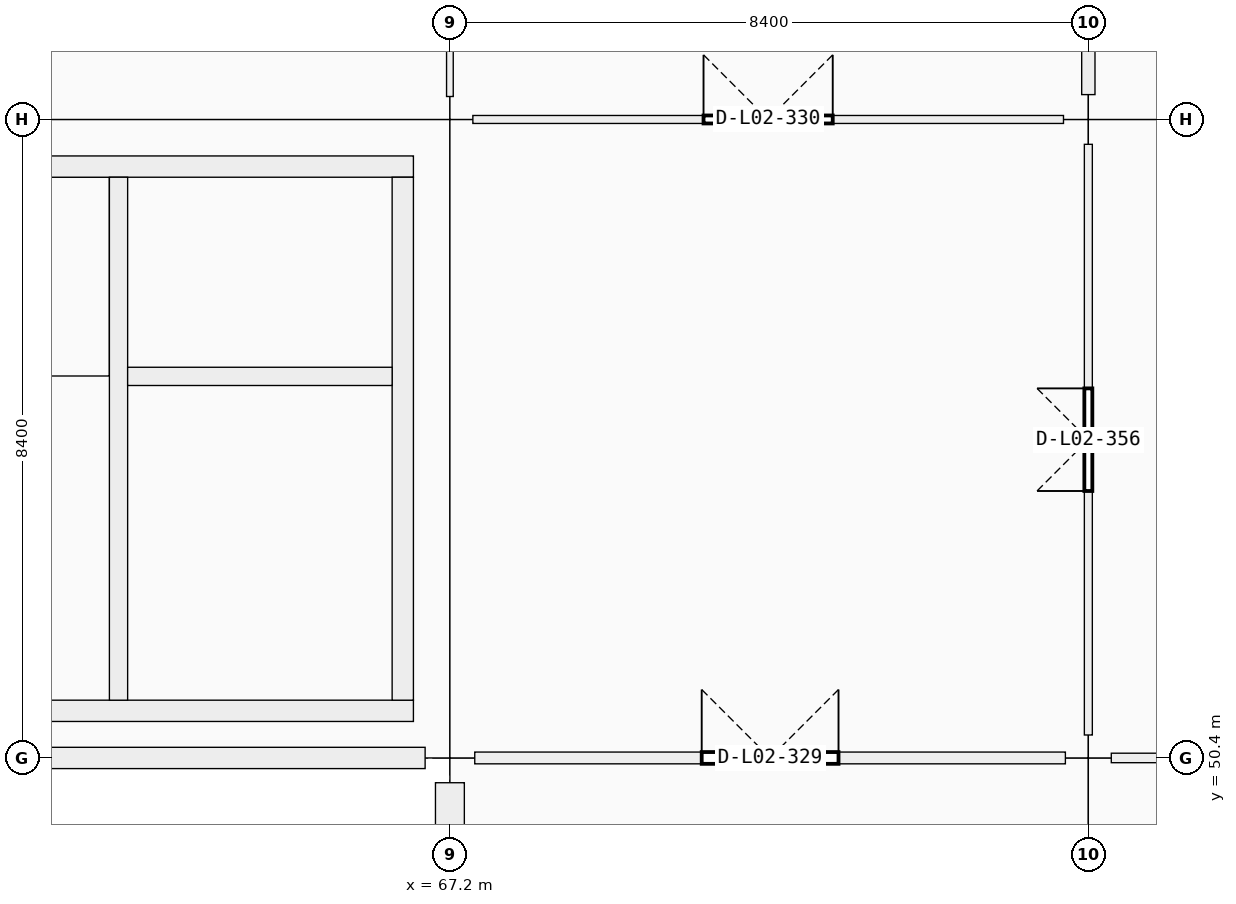
"""IFC4 building model, lengths in metres.
Left out: names, types, materials, properties, quantities, classifications, styles, units other than length and angle.
Written with IfcOpenShell. Run it as: python <this file> out.ifc"""

import sys

from ifc_helpers import new_model, si_unit, direction, frame, frame_2d, origin, origin_2d, place, context, subcontext, project, spatial, rectangle, extrude, element, fill, save


model = new_model("IFC4")
c1 = context("Model", 3, precision=1e-05, world=origin(), true_north=direction((0.0, 1.0)))
c2 = subcontext(c1, "Body", "Model", "MODEL_VIEW")
j1 = project(units=[si_unit("LENGTHUNIT", "METRE"), si_unit("PLANEANGLEUNIT", "RADIAN")], contexts=[c1])
p1 = place(None, origin())
s1 = spatial("IfcSite", under=j1, at=p1, CompositionType="ELEMENT")
p2 = place(p1, origin())
s2 = spatial("IfcBuilding", under=s1, at=p2, CompositionType="ELEMENT")
p3 = place(p2, frame((0.0, 0.0, 10.26)))
s3 = spatial("IfcBuildingStorey", under=s2, at=p3, CompositionType="ELEMENT", Elevation=10.26)
p4 = place(p3, frame((67.2, 50.4, 0.0), z_axis=(0.0, 0.0, 1.0), x_axis=(1.0, 0.0, 0.0)))
e1 = element("IfcColumn", 1, at=p4, inside=s3, PredefinedType="COLUMN", context=c2, shape_type="SweptSolid", body=[
    extrude(rectangle(XDim=0.65, YDim=0.65, at=origin_2d()), origin(), (0.0, 0.0, 1.0), 4.5),
])
for number, where, z_axis, x_axis in (
    (2, (67.2, 58.8, 0.0), (0.0, 0.0, 1.0), (1.0, 0.0, 0.0)),
    (3, (75.6, 50.4, 0.0), (0.0, 0.0, 1.0), (1.0, 0.0, 0.0)),
):
    element("IfcColumn", number, at=place(p3, frame(where, z_axis=z_axis, x_axis=x_axis)), inside=s3, PredefinedType="COLUMN", context=c2, shape_type="SweptSolid", body=[
        extrude(rectangle(XDim=0.6, YDim=0.6, at=origin_2d()), origin(), (0.0, 0.0, 1.0), 4.5),
    ])
p5 = place(p3, frame((75.6, 58.8, -0.3), z_axis=(0.0, 0.0, 1.0), x_axis=(1.0, 0.0, 0.0)))
e4 = element("IfcColumn", 4, at=p5, inside=s3, PredefinedType="COLUMN", context=c2, shape_type="SweptSolid", body=[
    extrude(rectangle(XDim=0.65, YDim=0.65, at=origin_2d()), origin(), (0.0, 0.0, 1.0), 4.8),
])
p6 = place(p3, frame((66.874, 50.4, 0.0), z_axis=(0.0, 0.0, 1.0), x_axis=(-1.0, 0.0, 0.0)))
e5 = element("IfcWall", 5, at=p6, inside=s3, PredefinedType="SOLIDWALL", context=c2, shape_type="SweptSolid", body=[
    extrude(rectangle(XDim=7.773, YDim=0.28, at=frame_2d((3.886, 0.0))), origin(), (0.0, 0.0, 1.0), 3.54),
])
p7 = place(p3, frame((67.2, 42.301, 0.0), z_axis=(0.0, 0.0, 1.0), x_axis=(0.0, 1.0, 0.0)))
e6 = element("IfcWall", 6, at=p7, inside=s3, PredefinedType="SOLIDWALL", context=c2, shape_type="SweptSolid", body=[
    extrude(rectangle(XDim=7.773, YDim=0.38, at=frame_2d((3.886, 0.0))), origin(), (0.0, 0.0, 1.0), 3.54),
])
for number, where, z_axis, x_axis in (
    (7, (66.72, 51.02, 0.0), (0.0, 0.0, 1.0), (-1.0, 0.0, 0.0)),
    (8, (59.28, 58.18, 0.0), (0.0, 0.0, 1.0), (1.0, 0.0, 0.0)),
):
    element("IfcWall", number, at=place(p3, frame(where, z_axis=z_axis, x_axis=x_axis)), inside=s3, PredefinedType="SHEAR", context=c2, shape_type="SweptSolid", body=[
        extrude(rectangle(XDim=7.44, YDim=0.28, at=frame_2d((3.72, 0.0))), origin(), (0.0, 0.0, 1.0), 4.5),
    ])
p8 = place(p3, frame((66.58, 58.04, 0.0), z_axis=(0.0, 0.0, 1.0), x_axis=(0.0, -1.0, 0.0)))
e9 = element("IfcWall", 9, at=p8, inside=s3, PredefinedType="SHEAR", context=c2, shape_type="SweptSolid", body=[
    extrude(rectangle(XDim=6.88, YDim=0.28, at=frame_2d((3.44, 0.0))), origin(), (0.0, 0.0, 1.0), 4.5),
])
p9 = place(p8, frame((3.99, 0.0, 0.0)))
e10 = element("IfcOpeningElement", 10, at=p9, cuts=e9, PredefinedType="OPENING", context=c2, shape_type="SweptSolid", body=[
    extrude(rectangle(XDim=1.5, YDim=2.15, at=frame_2d((0.75, 1.075))), frame((0.0, 0.14, 0.0), z_axis=(0.0, -1.0, 0.0), x_axis=(1.0, 0.0, 0.0)), (0.0, 0.0, 1.0), 0.28),
])
p10 = place(p3, frame((62.84, 51.16, 0.0), z_axis=(0.0, 0.0, 1.0), x_axis=(0.0, 1.0, 0.0)))
e11 = element("IfcWall", 11, at=p10, inside=s3, PredefinedType="SHEAR", context=c2, shape_type="SweptSolid", body=[
    extrude(rectangle(XDim=6.88, YDim=0.24, at=frame_2d((3.44, 0.0))), origin(), (0.0, 0.0, 1.0), 4.5),
])
p11 = place(p10, frame((0.12, 0.0, 0.0)))
e12 = element("IfcOpeningElement", 12, at=p11, cuts=e11, PredefinedType="OPENING", context=c2, shape_type="SweptSolid", body=[
    extrude(rectangle(XDim=1.0, YDim=2.15, at=frame_2d((0.5, 1.075))), frame((0.0, 0.12, 0.0), z_axis=(0.0, -1.0, 0.0), x_axis=(1.0, 0.0, 0.0)), (0.0, 0.0, 1.0), 0.24),
])
p12 = place(p3, frame((62.96, 55.42, 0.0), z_axis=(0.0, 0.0, 1.0), x_axis=(1.0, 0.0, 0.0)))
e13 = element("IfcWall", 13, at=p12, inside=s3, PredefinedType="SHEAR", context=c2, shape_type="SweptSolid", body=[
    extrude(rectangle(XDim=3.48, YDim=0.24, at=frame_2d((1.74, 0.0))), origin(), (0.0, 0.0, 1.0), 4.5),
])
p13 = place(p12, frame((1.19, 0.0, 0.0)))
e14 = element("IfcOpeningElement", 14, at=p13, cuts=e13, PredefinedType="OPENING", context=c2, shape_type="SweptSolid", body=[
    extrude(rectangle(XDim=1.1, YDim=2.15, at=frame_2d((0.55, 1.075))), frame((0.0, 0.12, 0.0), z_axis=(0.0, -1.0, 0.0), x_axis=(1.0, 0.0, 0.0)), (0.0, 0.0, 1.0), 0.24),
])
p14 = place(p3, frame((67.527, 50.4, 0.0), z_axis=(0.0, 0.0, 1.0), x_axis=(1.0, 0.0, 0.0)))
e15 = element("IfcWall", 15, at=p14, inside=s3, PredefinedType="PARTITIONING", context=c2, shape_type="SweptSolid", body=[
    extrude(rectangle(XDim=7.771, YDim=0.155, at=frame_2d((3.885, 0.0))), origin(), (0.0, 0.0, 1.0), 3.37),
])
p15 = place(p14, frame((2.986, 0.0, 0.0)))
e16 = element("IfcOpeningElement", 16, at=p15, cuts=e15, PredefinedType="OPENING", context=c2, shape_type="SweptSolid", body=[
    extrude(rectangle(XDim=1.8, YDim=2.4, at=frame_2d((0.9, 1.2))), frame((0.0, 0.078, 0.0), z_axis=(0.0, -1.0, 0.0), x_axis=(1.0, 0.0, 0.0)), (0.0, 0.0, 1.0), 0.155),
])
p16 = place(p3, frame((67.502, 58.8, 0.0), z_axis=(0.0, 0.0, 1.0), x_axis=(1.0, 0.0, 0.0)))
e17 = element("IfcWall", 17, at=p16, inside=s3, PredefinedType="PARTITIONING", context=c2, shape_type="SweptSolid", body=[
    extrude(rectangle(XDim=7.771, YDim=0.105, at=frame_2d((3.885, 0.0))), origin(), (0.0, 0.0, 1.0), 3.37),
])
p17 = place(p16, frame((3.035, 0.0, 0.0)))
e18 = element("IfcOpeningElement", 18, at=p17, cuts=e17, PredefinedType="OPENING", context=c2, shape_type="SweptSolid", body=[
    extrude(rectangle(XDim=1.7, YDim=2.35, at=frame_2d((0.85, 1.175))), frame((0.0, 0.052, 0.0), z_axis=(0.0, -1.0, 0.0), x_axis=(1.0, 0.0, 0.0)), (0.0, 0.0, 1.0), 0.105),
])
p18 = place(p3, frame((75.902, 50.4, 0.0), z_axis=(0.0, 0.0, 1.0), x_axis=(1.0, 0.0, 0.0)))
e19 = element("IfcWall", 19, at=p18, inside=s3, PredefinedType="PARTITIONING", context=c2, shape_type="SweptSolid", body=[
    extrude(rectangle(XDim=7.771, YDim=0.125, at=frame_2d((3.885, 0.0))), origin(), (0.0, 0.0, 1.0), 3.37),
])
p19 = place(p18, frame((3.135, 0.0, 0.0)))
e20 = element("IfcOpeningElement", 20, at=p19, cuts=e19, PredefinedType="OPENING", context=c2, shape_type="SweptSolid", body=[
    extrude(rectangle(XDim=1.5, YDim=2.25, at=frame_2d((0.75, 1.125))), frame((0.0, 0.062, 0.0), z_axis=(0.0, -1.0, 0.0), x_axis=(1.0, 0.0, 0.0)), (0.0, 0.0, 1.0), 0.125),
])
p20 = place(p3, frame((67.2, 59.102, 0.0), z_axis=(0.0, 0.0, 1.0), x_axis=(0.0, 1.0, 0.0)))
e21 = element("IfcWall", 21, at=p20, inside=s3, PredefinedType="PARTITIONING", context=c2, shape_type="SweptSolid", body=[
    extrude(rectangle(XDim=7.771, YDim=0.088, at=frame_2d((3.885, 0.0))), origin(), (0.0, 0.0, 1.0), 3.37),
])
p21 = place(p20, frame((3.415, 0.0, 0.0)))
e22 = element("IfcOpeningElement", 22, at=p21, cuts=e21, PredefinedType="OPENING", context=c2, shape_type="SweptSolid", body=[
    extrude(rectangle(XDim=0.94, YDim=2.15, at=frame_2d((0.47, 1.075))), frame((0.0, 0.044, 0.0), z_axis=(0.0, -1.0, 0.0), x_axis=(1.0, 0.0, 0.0)), (0.0, 0.0, 1.0), 0.088),
])
p22 = place(p3, frame((75.6, 50.702, 0.0), z_axis=(0.0, 0.0, 1.0), x_axis=(0.0, 1.0, 0.0)))
e23 = element("IfcWall", 23, at=p22, inside=s3, PredefinedType="PARTITIONING", context=c2, shape_type="SweptSolid", body=[
    extrude(rectangle(XDim=7.771, YDim=0.105, at=frame_2d((3.885, 0.0))), origin(), (0.0, 0.0, 1.0), 3.37),
])
p23 = place(p22, frame((3.21, 0.0, 0.0)))
e24 = element("IfcOpeningElement", 24, at=p23, cuts=e23, PredefinedType="OPENING", context=c2, shape_type="SweptSolid", body=[
    extrude(rectangle(XDim=1.35, YDim=2.2, at=frame_2d((0.675, 1.1))), frame((0.0, 0.052, 0.0), z_axis=(0.0, -1.0, 0.0), x_axis=(1.0, 0.0, 0.0)), (0.0, 0.0, 1.0), 0.105),
])
p24 = place(p3, frame((75.6, 59.127, 0.0), z_axis=(0.0, 0.0, 1.0), x_axis=(0.0, 1.0, 0.0)))
e25 = element("IfcWall", 25, at=p24, inside=s3, PredefinedType="PARTITIONING", context=c2, shape_type="SweptSolid", body=[
    extrude(rectangle(XDim=7.771, YDim=0.175, at=frame_2d((3.885, 0.0))), origin(), (0.0, 0.0, 1.0), 3.37),
])
p25 = place(p24, frame((2.986, 0.0, 0.0)))
e26 = element("IfcOpeningElement", 26, at=p25, cuts=e25, PredefinedType="OPENING", context=c2, shape_type="SweptSolid", body=[
    extrude(rectangle(XDim=1.8, YDim=2.4, at=frame_2d((0.9, 1.2))), frame((0.0, 0.087, 0.0), z_axis=(0.0, -1.0, 0.0), x_axis=(1.0, 0.0, 0.0)), (0.0, 0.0, 1.0), 0.175),
])
p26 = place(p11, origin())
e27 = element("IfcDoor", 27, at=p26, inside=s3, OperationType="SINGLE_SWING_RIGHT", PredefinedType="DOOR", context=c2, shape_type="SweptSolid", body=[
    extrude(rectangle(XDim=1.0, YDim=2.15, at=frame_2d((0.5, 1.075))), frame((0.0, 0.025, 0.0), z_axis=(0.0, -1.0, 0.0), x_axis=(1.0, 0.0, 0.0)), (0.0, 0.0, 1.0), 0.05),
])
fill(e12, e27)
p27 = place(p9, origin())
e28 = element("IfcDoor", 28, at=p27, inside=s3, OperationType="DOUBLE_DOOR_SINGLE_SWING", PredefinedType="DOOR", context=c2, shape_type="SweptSolid", body=[
    extrude(rectangle(XDim=1.5, YDim=2.15, at=frame_2d((0.75, 1.075))), frame((0.0, 0.025, 0.0), z_axis=(0.0, -1.0, 0.0), x_axis=(1.0, 0.0, 0.0)), (0.0, 0.0, 1.0), 0.05),
])
fill(e10, e28)
p28 = place(p13, origin())
e29 = element("IfcDoor", 29, at=p28, inside=s3, OperationType="DOUBLE_DOOR_SLIDING", PredefinedType="DOOR", context=c2, shape_type="SweptSolid", body=[
    extrude(rectangle(XDim=1.1, YDim=2.15, at=frame_2d((0.55, 1.075))), frame((0.0, 0.025, 0.0), z_axis=(0.0, -1.0, 0.0), x_axis=(1.0, 0.0, 0.0)), (0.0, 0.0, 1.0), 0.05),
])
fill(e14, e29)
p29 = place(p15, origin())
e30 = element("IfcDoor", 30, at=p29, inside=s3, OperationType="DOUBLE_DOOR_SINGLE_SWING", PredefinedType="DOOR", context=c2, shape_type="SweptSolid", body=[
    extrude(rectangle(XDim=1.8, YDim=2.4, at=frame_2d((0.9, 1.2))), frame((0.0, 0.025, 0.0), z_axis=(0.0, -1.0, 0.0), x_axis=(1.0, 0.0, 0.0)), (0.0, 0.0, 1.0), 0.05),
])
fill(e16, e30)
p30 = place(p17, origin())
e31 = element("IfcDoor", 31, at=p30, inside=s3, OperationType="DOUBLE_DOOR_SINGLE_SWING", PredefinedType="DOOR", context=c2, shape_type="SweptSolid", body=[
    extrude(rectangle(XDim=1.7, YDim=2.35, at=frame_2d((0.85, 1.175))), frame((0.0, 0.025, 0.0), z_axis=(0.0, -1.0, 0.0), x_axis=(1.0, 0.0, 0.0)), (0.0, 0.0, 1.0), 0.05),
])
fill(e18, e31)
p31 = place(p23, origin())
e32 = element("IfcDoor", 32, at=p31, inside=s3, OperationType="DOUBLE_DOOR_SINGLE_SWING", PredefinedType="DOOR", context=c2, shape_type="SweptSolid", body=[
    extrude(rectangle(XDim=1.35, YDim=2.2, at=frame_2d((0.675, 1.1))), frame((0.0, 0.025, 0.0), z_axis=(0.0, -1.0, 0.0), x_axis=(1.0, 0.0, 0.0)), (0.0, 0.0, 1.0), 0.05),
])
fill(e24, e32)
save(model, sys.argv[1])
